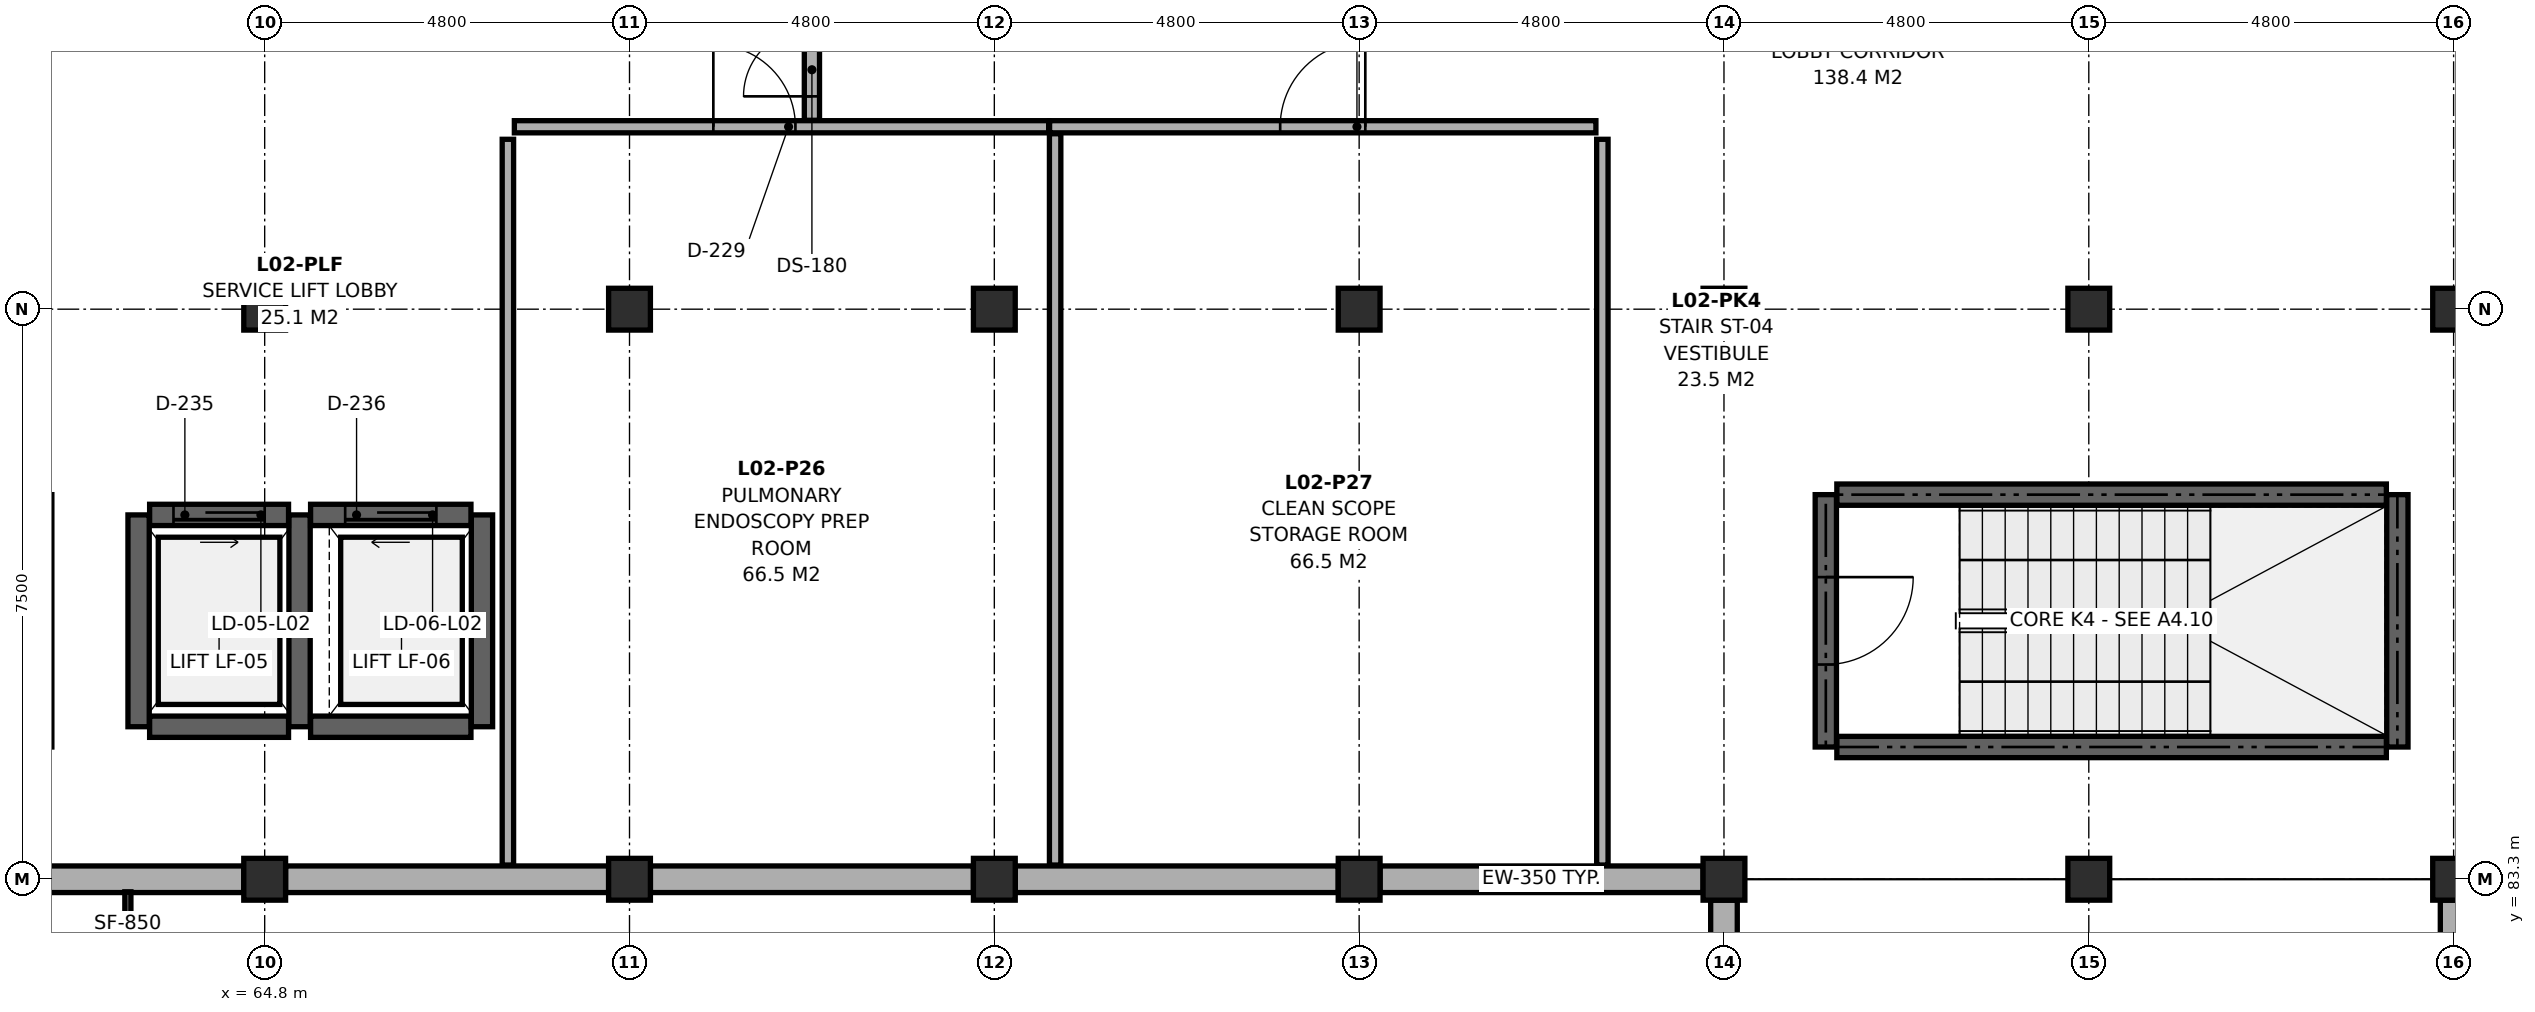
"""IFC4 building model, lengths in metres.
Left out: names, types, materials, properties, quantities, classifications, styles, units other than length and angle.
Written with IfcOpenShell. Run it as: python <this file> out.ifc"""

import sys

from ifc_helpers import new_model, si_unit, direction, frame, frame_2d, origin, origin_2d, place, context, subcontext, project, spatial, rectangle, extrude, element, fill, save


model = new_model("IFC4")
c1 = context("Model", 3, precision=1e-05, world=origin(), true_north=direction((0.0, 1.0)))
c2 = subcontext(c1, "Body", "Model", "MODEL_VIEW")
j1 = project(units=[si_unit("LENGTHUNIT", "METRE"), si_unit("PLANEANGLEUNIT", "RADIAN")], contexts=[c1])
p1 = place(None, origin())
s1 = spatial("IfcSite", under=j1, at=p1, CompositionType="ELEMENT")
p2 = place(p1, origin())
s2 = spatial("IfcBuilding", under=s1, at=p2, CompositionType="ELEMENT")
p3 = place(p2, frame((0.0, 0.0, 9.5)))
s3 = spatial("IfcBuildingStorey", under=s2, at=p3, CompositionType="ELEMENT", Elevation=9.5)
for number, where, z_axis, x_axis in (
    (1, (64.8, 83.3, 0.0), (0.0, 0.0, 1.0), (1.0, 0.0, 0.0)),
    (2, (64.8, 90.8, 0.0), (0.0, 0.0, 1.0), (1.0, 0.0, 0.0)),
    (3, (69.6, 83.3, 0.0), (0.0, 0.0, 1.0), (1.0, 0.0, 0.0)),
    (4, (69.6, 90.8, 0.0), (0.0, 0.0, 1.0), (1.0, 0.0, 0.0)),
    (5, (74.4, 83.3, 0.0), (0.0, 0.0, 1.0), (1.0, 0.0, 0.0)),
    (6, (74.4, 90.8, 0.0), (0.0, 0.0, 1.0), (1.0, 0.0, 0.0)),
    (7, (79.2, 83.3, 0.0), (0.0, 0.0, 1.0), (1.0, 0.0, 0.0)),
    (8, (79.2, 90.8, 0.0), (0.0, 0.0, 1.0), (1.0, 0.0, 0.0)),
):
    element("IfcColumn", number, at=place(p3, frame(where, z_axis=z_axis, x_axis=x_axis)), inside=s3, PredefinedType="COLUMN", context=c2, shape_type="SweptSolid", body=[
        extrude(rectangle(XDim=0.55, YDim=0.55, at=origin_2d()), origin(), (0.0, 0.0, 1.0), 3.7),
    ])
p4 = place(p3, frame((84.0, 83.3, 0.0), z_axis=(0.0, 0.0, 1.0), x_axis=(1.0, 0.0, 0.0)))
e9 = element("IfcColumn", 9, at=p4, inside=s3, PredefinedType="COLUMN", context=c2, shape_type="SweptSolid", body=[
    extrude(rectangle(XDim=0.55, YDim=0.55, at=origin_2d()), origin(), (0.0, 0.0, 1.0), 3.8),
])
for number, where, z_axis, x_axis in (
    (10, (84.0, 90.8, 0.0), (0.0, 0.0, 1.0), (1.0, 0.0, 0.0)),
    (11, (88.8, 83.3, 0.0), (0.0, 0.0, 1.0), (1.0, 0.0, 0.0)),
    (12, (88.8, 90.8, 0.0), (0.0, 0.0, 1.0), (1.0, 0.0, 0.0)),
):
    element("IfcColumn", number, at=place(p3, frame(where, z_axis=z_axis, x_axis=x_axis)), inside=s3, PredefinedType="COLUMN", context=c2, shape_type="SweptSolid", body=[
        extrude(rectangle(XDim=0.55, YDim=0.55, at=origin_2d()), origin(), (0.0, 0.0, 1.0), 3.7),
    ])
p5 = place(p3, frame((93.6, 83.3, 0.0), z_axis=(0.0, 0.0, 1.0), x_axis=(1.0, 0.0, 0.0)))
e13 = element("IfcColumn", 13, at=p5, inside=s3, PredefinedType="COLUMN", context=c2, shape_type="SweptSolid", body=[
    extrude(rectangle(XDim=0.55, YDim=0.55, at=origin_2d()), origin(), (0.0, 0.0, 1.0), 3.8),
])
p6 = place(p3, frame((93.6, 90.8, 0.0), z_axis=(0.0, 0.0, 1.0), x_axis=(1.0, 0.0, 0.0)))
e14 = element("IfcColumn", 14, at=p6, inside=s3, PredefinedType="COLUMN", context=c2, shape_type="SweptSolid", body=[
    extrude(rectangle(XDim=0.55, YDim=0.55, at=origin_2d()), origin(), (0.0, 0.0, 1.0), 3.7),
])
for number, where, z_axis, x_axis in (
    (15, (83.725, 83.3, 0.0), (0.0, 0.0, 1.0), (-1.0, 0.0, 0.0)),
    (16, (78.925, 83.3, 0.0), (0.0, 0.0, 1.0), (-1.0, 0.0, 0.0)),
    (17, (74.125, 83.3, 0.0), (0.0, 0.0, 1.0), (-1.0, 0.0, 0.0)),
    (18, (69.325, 83.3, 0.0), (0.0, 0.0, 1.0), (-1.0, 0.0, 0.0)),
):
    element("IfcWall", number, at=place(p3, frame(where, z_axis=z_axis, x_axis=x_axis)), inside=s3, PredefinedType="SOLIDWALL", context=c2, shape_type="SweptSolid", body=[
        extrude(rectangle(XDim=4.25, YDim=0.35, at=frame_2d((2.125, 0.0))), origin(), (0.0, 0.0, 1.0), 2.985),
    ])
p7 = place(p3, frame((64.525, 83.3, 0.0), z_axis=(0.0, 0.0, 1.0), x_axis=(-1.0, 0.0, 0.0)))
e19 = element("IfcWall", 19, at=p7, inside=s3, PredefinedType="SOLIDWALL", context=c2, shape_type="SweptSolid", body=[
    extrude(rectangle(XDim=4.25, YDim=0.35, at=frame_2d((2.125, 0.0))), origin(), (0.0, 0.0, 1.0), 3.035),
])
for number, where, z_axis, x_axis in (
    (20, (93.6, 83.025, 0.0), (0.0, 0.0, 1.0), (0.0, -1.0, 0.0)),
    (21, (84.0, 76.125, 0.0), (0.0, 0.0, 1.0), (0.0, 1.0, 0.0)),
):
    element("IfcWall", number, at=place(p3, frame(where, z_axis=z_axis, x_axis=x_axis)), inside=s3, PredefinedType="SOLIDWALL", context=c2, shape_type="SweptSolid", body=[
        extrude(rectangle(XDim=6.9, YDim=0.35, at=frame_2d((3.45, 0.0))), origin(), (0.0, 0.0, 1.0), 3.035),
    ])
p8 = place(p3, frame((61.86, 85.04, 0.0), z_axis=(0.0, 0.0, 1.0), x_axis=(0.0, 1.0, 0.0)))
e22 = element("IfcWall", 22, at=p8, inside=s3, PredefinedType="SHEAR", context=c2, shape_type="SweptSolid", body=[
    extrude(rectangle(XDim=3.32, YDim=0.28, at=frame_2d((1.66, 0.0))), origin(), (0.0, 0.0, 1.0), 3.7),
])
p9 = place(p3, frame((63.286, 85.307, 0.0), z_axis=(0.0, 0.0, 1.0), x_axis=(1.0, 0.0, 0.0)))
e23 = element("IfcWall", 23, at=p9, inside=s3, PredefinedType="SHEAR", context=c2, shape_type="SweptSolid", body=[
    extrude(rectangle(XDim=1.828, YDim=0.28, at=frame_2d((0.914, 0.0))), origin(), (0.0, 0.0, 1.0), 3.7),
])
p10 = place(p3, frame((65.259, 85.307, 0.0), z_axis=(0.0, 0.0, 1.0), x_axis=(0.0, 1.0, 0.0)))
e24 = element("IfcWall", 24, at=p10, inside=s3, PredefinedType="SHEAR", context=c2, shape_type="SweptSolid", body=[
    extrude(rectangle(XDim=2.787, YDim=0.28, at=frame_2d((1.393, 0.0))), origin(), (0.0, 0.0, 1.0), 3.7),
])
p11 = place(p3, frame((65.114, 88.093, 0.0), z_axis=(0.0, 0.0, 1.0), x_axis=(-1.0, 0.0, 0.0)))
e25 = element("IfcWall", 25, at=p11, inside=s3, PredefinedType="SHEAR", context=c2, shape_type="SweptSolid", body=[
    extrude(rectangle(XDim=1.828, YDim=0.28, at=frame_2d((0.914, 0.0))), origin(), (0.0, 0.0, 1.0), 3.7),
])
p12 = place(p11, frame((0.314, 0.0, 0.0)))
e26 = element("IfcOpeningElement", 26, at=p12, cuts=e25, PredefinedType="OPENING", context=c2, shape_type="SweptSolid", body=[
    extrude(rectangle(XDim=1.2, YDim=2.15, at=frame_2d((0.6, 1.075))), frame((0.0, 0.152, 0.0), z_axis=(0.0, -1.0, 0.0), x_axis=(1.0, 0.0, 0.0)), (0.0, 0.0, 1.0), 0.304),
])
p13 = place(p3, frame((63.141, 88.093, 0.0), z_axis=(0.0, 0.0, 1.0), x_axis=(0.0, -1.0, 0.0)))
e27 = element("IfcWall", 27, at=p13, inside=s3, PredefinedType="SHEAR", context=c2, shape_type="SweptSolid", body=[
    extrude(rectangle(XDim=2.787, YDim=0.28, at=frame_2d((1.393, 0.0))), origin(), (0.0, 0.0, 1.0), 3.7),
])
p14 = place(p3, frame((65.404, 85.307, 0.0), z_axis=(0.0, 0.0, 1.0), x_axis=(1.0, 0.0, 0.0)))
e28 = element("IfcWall", 28, at=p14, inside=s3, PredefinedType="SHEAR", context=c2, shape_type="SweptSolid", body=[
    extrude(rectangle(XDim=2.11, YDim=0.28, at=frame_2d((1.055, 0.0))), origin(), (0.0, 0.0, 1.0), 3.7),
])
p15 = place(p3, frame((67.659, 85.307, 0.0), z_axis=(0.0, 0.0, 1.0), x_axis=(0.0, 1.0, 0.0)))
e29 = element("IfcWall", 29, at=p15, inside=s3, PredefinedType="SHEAR", context=c2, shape_type="SweptSolid", body=[
    extrude(rectangle(XDim=2.787, YDim=0.28, at=frame_2d((1.393, 0.0))), origin(), (0.0, 0.0, 1.0), 3.7),
])
p16 = place(p3, frame((67.514, 88.093, 0.0), z_axis=(0.0, 0.0, 1.0), x_axis=(-1.0, 0.0, 0.0)))
e30 = element("IfcWall", 30, at=p16, inside=s3, PredefinedType="SHEAR", context=c2, shape_type="SweptSolid", body=[
    extrude(rectangle(XDim=2.11, YDim=0.28, at=frame_2d((1.055, 0.0))), origin(), (0.0, 0.0, 1.0), 3.7),
])
p17 = place(p16, frame((0.455, 0.0, 0.0)))
e31 = element("IfcOpeningElement", 31, at=p17, cuts=e30, PredefinedType="OPENING", context=c2, shape_type="SweptSolid", body=[
    extrude(rectangle(XDim=1.2, YDim=2.15, at=frame_2d((0.6, 1.075))), frame((0.0, 0.152, 0.0), z_axis=(0.0, -1.0, 0.0), x_axis=(1.0, 0.0, 0.0)), (0.0, 0.0, 1.0), 0.304),
])
p18 = place(p3, frame((85.485, 85.04, 0.0), z_axis=(0.0, 0.0, 1.0), x_axis=(1.0, 0.0, 0.0)))
e32 = element("IfcWall", 32, at=p18, inside=s3, PredefinedType="SHEAR", context=c2, shape_type="SweptSolid", body=[
    extrude(rectangle(XDim=7.23, YDim=0.28, at=frame_2d((3.615, 0.0))), origin(), (0.0, 0.0, 1.0), 3.7),
])
p19 = place(p3, frame((92.86, 85.04, 0.0), z_axis=(0.0, 0.0, 1.0), x_axis=(0.0, 1.0, 0.0)))
e33 = element("IfcWall", 33, at=p19, inside=s3, PredefinedType="SHEAR", context=c2, shape_type="SweptSolid", body=[
    extrude(rectangle(XDim=3.32, YDim=0.28, at=frame_2d((1.66, 0.0))), origin(), (0.0, 0.0, 1.0), 3.7),
])
p20 = place(p3, frame((92.715, 88.36, 0.0), z_axis=(0.0, 0.0, 1.0), x_axis=(-1.0, 0.0, 0.0)))
e34 = element("IfcWall", 34, at=p20, inside=s3, PredefinedType="SHEAR", context=c2, shape_type="SweptSolid", body=[
    extrude(rectangle(XDim=7.23, YDim=0.28, at=frame_2d((3.615, 0.0))), origin(), (0.0, 0.0, 1.0), 3.7),
])
p21 = place(p3, frame((85.34, 88.36, 0.0), z_axis=(0.0, 0.0, 1.0), x_axis=(0.0, -1.0, 0.0)))
e35 = element("IfcWall", 35, at=p21, inside=s3, PredefinedType="SHEAR", context=c2, shape_type="SweptSolid", body=[
    extrude(rectangle(XDim=3.32, YDim=0.28, at=frame_2d((1.66, 0.0))), origin(), (0.0, 0.0, 1.0), 3.7),
])
p22 = place(p21, frame((1.085, 0.0, 0.0)))
e36 = element("IfcOpeningElement", 36, at=p22, cuts=e35, PredefinedType="OPENING", context=c2, shape_type="SweptSolid", body=[
    extrude(rectangle(XDim=1.15, YDim=2.15, at=frame_2d((0.575, 1.075))), frame((0.0, 0.152, 0.0), z_axis=(0.0, -1.0, 0.0), x_axis=(1.0, 0.0, 0.0)), (0.0, 0.0, 1.0), 0.304),
])
p23 = place(p3, frame((72.0, 93.285, 0.0), z_axis=(0.0, 0.0, 1.0), x_axis=(0.0, 1.0, 0.0)))
e37 = element("IfcWall", 37, at=p23, inside=s3, PredefinedType="PARTITIONING", context=c2, shape_type="SweptSolid", body=[
    extrude(rectangle(XDim=2.43, YDim=0.2, at=frame_2d((1.215, 0.0))), origin(), (0.0, 0.0, 1.0), 3.7),
])
p24 = place(p23, frame((0.315, 0.0, 0.0)))
e38 = element("IfcOpeningElement", 38, at=p24, cuts=e37, PredefinedType="OPENING", context=c2, shape_type="SweptSolid", body=[
    extrude(rectangle(XDim=1.8, YDim=2.15, at=frame_2d((0.9, 1.075))), frame((0.0, 0.112, 0.0), z_axis=(0.0, -1.0, 0.0), x_axis=(1.0, 0.0, 0.0)), (0.0, 0.0, 1.0), 0.224),
])
p25 = place(p3, frame((68.085, 93.2, 0.0), z_axis=(0.0, 0.0, 1.0), x_axis=(1.0, 0.0, 0.0)))
e39 = element("IfcWall", 39, at=p25, inside=s3, PredefinedType="PARTITIONING", context=c2, shape_type="SweptSolid", body=[
    extrude(rectangle(XDim=7.03, YDim=0.16, at=frame_2d((3.515, 0.0))), origin(), (0.0, 0.0, 1.0), 2.985),
])
p26 = place(p25, frame((2.618, 0.0, 0.0)))
e40 = element("IfcOpeningElement", 40, at=p26, cuts=e39, PredefinedType="OPENING", context=c2, shape_type="SweptSolid", body=[
    extrude(rectangle(XDim=1.08, YDim=2.18, at=frame_2d((0.54, 1.09))), frame((0.0, 0.092, 0.0), z_axis=(0.0, -1.0, 0.0), x_axis=(1.0, 0.0, 0.0)), (0.0, 0.0, 1.0), 0.184),
])
p27 = place(p3, frame((75.127, 93.2, 0.0), z_axis=(0.0, 0.0, 1.0), x_axis=(1.0, 0.0, 0.0)))
e41 = element("IfcWall", 41, at=p27, inside=s3, PredefinedType="PARTITIONING", context=c2, shape_type="SweptSolid", body=[
    extrude(rectangle(XDim=7.188, YDim=0.16, at=frame_2d((3.594, 0.0))), origin(), (0.0, 0.0, 1.0), 2.985),
])
p28 = place(p27, frame((3.034, 0.0, 0.0)))
e42 = element("IfcOpeningElement", 42, at=p28, cuts=e41, PredefinedType="OPENING", context=c2, shape_type="SweptSolid", body=[
    extrude(rectangle(XDim=1.12, YDim=2.2, at=frame_2d((0.56, 1.1))), frame((0.0, 0.092, 0.0), z_axis=(0.0, -1.0, 0.0), x_axis=(1.0, 0.0, 0.0)), (0.0, 0.0, 1.0), 0.184),
])
p29 = place(p3, frame((68.0, 83.487, 0.0), z_axis=(0.0, 0.0, 1.0), x_axis=(0.0, 1.0, 0.0)))
e43 = element("IfcWall", 43, at=p29, inside=s3, PredefinedType="PARTITIONING", context=c2, shape_type="SweptSolid", body=[
    extrude(rectangle(XDim=9.548, YDim=0.15, at=frame_2d((4.774, 0.0))), origin(), (0.0, 0.0, 1.0), 3.035),
])
p30 = place(p3, frame((75.2, 83.487, 0.0), z_axis=(0.0, 0.0, 1.0), x_axis=(0.0, 1.0, 0.0)))
e44 = element("IfcWall", 44, at=p30, inside=s3, PredefinedType="PARTITIONING", context=c2, shape_type="SweptSolid", body=[
    extrude(rectangle(XDim=9.621, YDim=0.15, at=frame_2d((4.811, 0.0))), origin(), (0.0, 0.0, 1.0), 3.035),
])
p31 = place(p3, frame((82.4, 83.487, 0.0), z_axis=(0.0, 0.0, 1.0), x_axis=(0.0, 1.0, 0.0)))
e45 = element("IfcWall", 45, at=p31, inside=s3, PredefinedType="PARTITIONING", context=c2, shape_type="SweptSolid", body=[
    extrude(rectangle(XDim=9.548, YDim=0.15, at=frame_2d((4.774, 0.0))), origin(), (0.0, 0.0, 1.0), 3.035),
])
p32 = place(p12, origin())
e46 = element("IfcDoor", 46, at=p32, inside=s3, OperationType="SLIDING_TO_LEFT", PredefinedType="DOOR", context=c2, shape_type="SweptSolid", body=[
    extrude(rectangle(XDim=1.2, YDim=2.15, at=frame_2d((0.6, 1.075))), frame((0.0, 0.025, 0.0), z_axis=(0.0, -1.0, 0.0), x_axis=(1.0, 0.0, 0.0)), (0.0, 0.0, 1.0), 0.05),
])
fill(e26, e46)
p33 = place(p17, origin())
e47 = element("IfcDoor", 47, at=p33, inside=s3, OperationType="SLIDING_TO_RIGHT", PredefinedType="DOOR", context=c2, shape_type="SweptSolid", body=[
    extrude(rectangle(XDim=1.2, YDim=2.15, at=frame_2d((0.6, 1.075))), frame((0.0, 0.025, 0.0), z_axis=(0.0, -1.0, 0.0), x_axis=(1.0, 0.0, 0.0)), (0.0, 0.0, 1.0), 0.05),
])
fill(e31, e47)
p34 = place(p22, origin())
e48 = element("IfcDoor", 48, at=p34, inside=s3, OperationType="SINGLE_SWING_LEFT", PredefinedType="DOOR", context=c2, shape_type="SweptSolid", body=[
    extrude(rectangle(XDim=1.15, YDim=2.15, at=frame_2d((0.575, 1.075))), frame((0.0, 0.025, 0.0), z_axis=(0.0, -1.0, 0.0), x_axis=(1.0, 0.0, 0.0)), (0.0, 0.0, 1.0), 0.05),
])
fill(e36, e48)
p35 = place(p24, origin())
e49 = element("IfcDoor", 49, at=p35, inside=s3, OperationType="DOUBLE_DOOR_SINGLE_SWING", PredefinedType="DOOR", context=c2, shape_type="SweptSolid", body=[
    extrude(rectangle(XDim=1.8, YDim=2.15, at=frame_2d((0.9, 1.075))), frame((0.0, 0.025, 0.0), z_axis=(0.0, -1.0, 0.0), x_axis=(1.0, 0.0, 0.0)), (0.0, 0.0, 1.0), 0.05),
])
fill(e38, e49)
p36 = place(p26, origin())
e50 = element("IfcDoor", 50, at=p36, inside=s3, OperationType="SINGLE_SWING_LEFT", PredefinedType="DOOR", context=c2, shape_type="SweptSolid", body=[
    extrude(rectangle(XDim=1.08, YDim=2.18, at=frame_2d((0.54, 1.09))), frame((0.0, 0.025, 0.0), z_axis=(0.0, -1.0, 0.0), x_axis=(1.0, 0.0, 0.0)), (0.0, 0.0, 1.0), 0.05),
])
fill(e40, e50)
p37 = place(p28, origin())
e51 = element("IfcDoor", 51, at=p37, inside=s3, OperationType="SINGLE_SWING_RIGHT", PredefinedType="DOOR", context=c2, shape_type="SweptSolid", body=[
    extrude(rectangle(XDim=1.12, YDim=2.2, at=frame_2d((0.56, 1.1))), frame((0.0, 0.025, 0.0), z_axis=(0.0, -1.0, 0.0), x_axis=(1.0, 0.0, 0.0)), (0.0, 0.0, 1.0), 0.05),
])
fill(e42, e51)
save(model, sys.argv[1])
